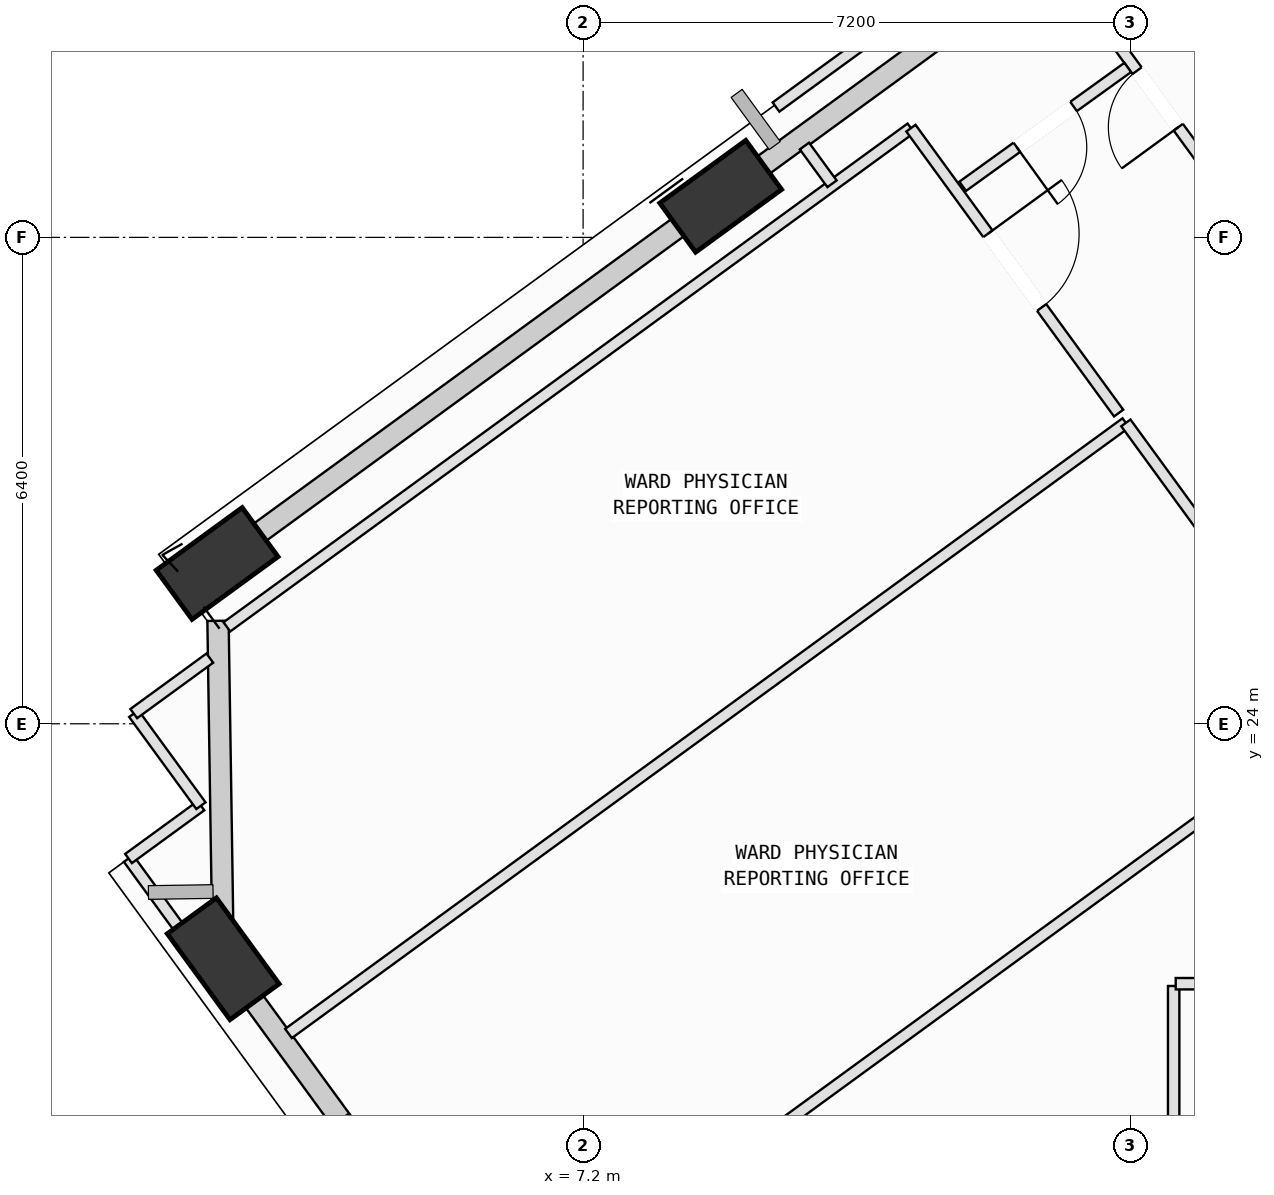
"""IFC4 building model, lengths in metres.
Left out: names, types, materials, properties, quantities, classifications, styles, units other than length and angle.
Written with IfcOpenShell. Run it as: python <this file> out.ifc"""

import sys

from ifc_helpers import new_model, si_unit, direction, frame, frame_2d, origin, origin_2d, place, context, subcontext, project, spatial, rectangle, extrude, element, fill, save


model = new_model("IFC4")
c1 = context("Model", 3, precision=1e-05, world=origin(), true_north=direction((0.0, 1.0)))
c2 = subcontext(c1, "Body", "Model", "MODEL_VIEW")
j1 = project(units=[si_unit("LENGTHUNIT", "METRE"), si_unit("PLANEANGLEUNIT", "RADIAN")], contexts=[c1])
p1 = place(None, origin())
s1 = spatial("IfcSite", under=j1, at=p1, CompositionType="ELEMENT")
p2 = place(p1, origin())
s2 = spatial("IfcBuilding", under=s1, at=p2, CompositionType="ELEMENT")
p3 = place(p2, frame((0.0, 0.0, 177.8)))
s3 = spatial("IfcBuildingStorey", under=s2, at=p3, CompositionType="ELEMENT", Elevation=177.8)
p4 = place(p3, frame((9.01, 30.941, 0.002), z_axis=(-0.024485078273, -0.101524977159, 0.994531628434), x_axis=(0.922851813441, 0.380208094737, 0.061533203441)))
e1 = element("IfcColumn", 1, at=p4, inside=s3, PredefinedType="COLUMN", context=c2, shape_type="SweptSolid", body=[
    extrude(rectangle(XDim=1.4, YDim=0.8, at=origin_2d()), origin(), (0.0, 0.0, 1.0), 4.018),
])
p5 = place(p3, frame((2.385, 26.109, 0.002), z_axis=(-0.004301534601, -0.128379603084, 0.991715772947), x_axis=(0.827104014737, 0.556929973682, 0.075683242671)))
e2 = element("IfcColumn", 2, at=p5, inside=s3, PredefinedType="COLUMN", context=c2, shape_type="SweptSolid", body=[
    extrude(rectangle(XDim=1.4, YDim=0.8, at=origin_2d()), origin(), (0.0, 0.0, 1.0), 4.03),
])
p6 = place(p3, frame((2.465, 20.908, 0.002), z_axis=(0.017083826497, -0.127825794003, 0.991649489114), x_axis=(-0.690145428743, 0.716129588878, 0.104200283673)))
e3 = element("IfcColumn", 3, at=p6, inside=s3, PredefinedType="COLUMN", context=c2, shape_type="SweptSolid", body=[
    extrude(rectangle(XDim=1.4, YDim=0.8, at=origin_2d()), origin(), (0.0, 0.0, 1.0), 4.03),
])
p7 = place(p3, frame((9.267, 31.128, 0.0), z_axis=(0.0, 0.0, 1.0), x_axis=(0.807974712065, 0.589217162567, 0.0)))
e4 = element("IfcWall", 4, at=p7, inside=s3, PredefinedType="SOLIDWALL", context=c2, shape_type="SweptSolid", body=[
    extrude(rectangle(XDim=7.231, YDim=0.28, at=frame_2d((3.615, 0.0))), origin(), (0.0, 0.0, 1.0), 3.265),
])
p8 = place(p3, frame((2.621, 26.282, 0.0), z_axis=(0.0, 0.0, 1.0), x_axis=(0.807987546016, 0.589199563377, 0.0)))
e5 = element("IfcWall", 5, at=p8, inside=s3, PredefinedType="SOLIDWALL", context=c2, shape_type="SweptSolid", body=[
    extrude(rectangle(XDim=7.27, YDim=0.28, at=frame_2d((3.635, 0.0))), origin(), (0.0, 0.0, 1.0), 3.265),
])
p9 = place(p3, frame((2.461, 21.145, 0.0), z_axis=(0.0, 0.0, 1.0), x_axis=(-0.015365849783, 0.999881938361, 0.0)))
e6 = element("IfcWall", 6, at=p9, inside=s3, PredefinedType="SOLIDWALL", context=c2, shape_type="SweptSolid", body=[
    extrude(rectangle(XDim=4.21, YDim=0.28, at=frame_2d((2.105, 0.0))), origin(), (0.0, 0.0, 1.0), 3.265),
])
p10 = place(p3, frame((6.198, 15.788, 0.0), z_axis=(0.0, 0.0, 1.0), x_axis=(-0.589159176224, 0.808016995534, 0.0)))
e7 = element("IfcWall", 7, at=p10, inside=s3, PredefinedType="SOLIDWALL", context=c2, shape_type="SweptSolid", body=[
    extrude(rectangle(XDim=5.628, YDim=0.28, at=frame_2d((2.814, 0.0))), origin(), (0.0, 0.0, 1.0), 3.265),
])
p11 = place(p10, frame((1.717, 0.0, 0.75)))
e8 = element("IfcOpeningElement", 8, at=p11, cuts=e7, PredefinedType="OPENING", context=c2, shape_type="SweptSolid", body=[
    extrude(rectangle(XDim=2.0, YDim=1.95, at=frame_2d((1.0, 0.975))), frame((0.0, 0.15, 0.0), z_axis=(0.0, -1.0, 0.0), x_axis=(1.0, 0.0, 0.0)), (0.0, 0.0, 1.0), 0.3),
])
p12 = place(p3, frame((14.97, 20.55, 0.0), z_axis=(0.0, 0.0, 1.0), x_axis=(0.0, -1.0, 0.0)))
e9 = element("IfcWall", 9, at=p12, inside=s3, PredefinedType="PARTITIONING", context=c2, shape_type="SweptSolid", body=[
    extrude(rectangle(XDim=2.32, YDim=0.15, at=frame_2d((1.16, 0.0))), origin(), (0.0, 0.0, 1.0), 3.78),
])
p13 = place(p3, frame((6.152, 16.047, 0.0), z_axis=(0.0, 0.0, 1.0), x_axis=(0.807978938545, 0.589211366886, 0.0)))
e10 = element("IfcWall", 10, at=p13, inside=s3, PredefinedType="PARTITIONING", context=c2, shape_type="SweptSolid", body=[
    extrude(rectangle(XDim=13.635, YDim=0.15, at=frame_2d((6.817, 0.0))), origin(), (0.0, 0.0, 1.0), 3.78),
])
p14 = place(p3, frame((19.722, 20.58, 0.0), z_axis=(0.0, 0.0, 1.0), x_axis=(-1.0, 0.0, 0.0)))
e11 = element("IfcWall", 11, at=p14, inside=s3, PredefinedType="PARTITIONING", context=c2, shape_type="SweptSolid", body=[
    extrude(rectangle(XDim=4.725, YDim=0.15, at=frame_2d((2.362, 0.0))), origin(), (0.0, 0.0, 1.0), 3.78),
])
p15 = place(p14, frame((1.762, 0.0, 0.0)))
e12 = element("IfcOpeningElement", 12, at=p15, cuts=e11, PredefinedType="OPENING", context=c2, shape_type="SweptSolid", body=[
    extrude(rectangle(XDim=1.2, YDim=2.15, at=frame_2d((0.6, 1.075))), frame((0.0, 0.085, 0.0), z_axis=(0.0, -1.0, 0.0), x_axis=(1.0, 0.0, 0.0)), (0.0, 0.0, 1.0), 0.17),
])
p16 = place(p3, frame((3.324, 19.925, 0.0), z_axis=(0.0, 0.0, 1.0), x_axis=(0.807985154612, 0.589202842769, 0.0)))
e13 = element("IfcWall", 13, at=p16, inside=s3, PredefinedType="PARTITIONING", context=c2, shape_type="SweptSolid", body=[
    extrude(rectangle(XDim=13.635, YDim=0.15, at=frame_2d((6.818, 0.0))), origin(), (0.0, 0.0, 1.0), 3.78),
])
p17 = place(p3, frame((14.341, 27.959, 0.0), z_axis=(0.0, 0.0, 1.0), x_axis=(0.589203646607, -0.807984568432, 0.0)))
e14 = element("IfcWall", 14, at=p17, inside=s3, PredefinedType="PARTITIONING", context=c2, shape_type="SweptSolid", body=[
    extrude(rectangle(XDim=4.64, YDim=0.15, at=frame_2d((2.32, 0.0))), origin(), (0.0, 0.0, 1.0), 3.78),
])
p18 = place(p17, frame((1.72, 0.0, 0.0)))
e15 = element("IfcOpeningElement", 15, at=p18, cuts=e14, PredefinedType="OPENING", context=c2, shape_type="SweptSolid", body=[
    extrude(rectangle(XDim=1.2, YDim=2.15, at=frame_2d((0.6, 1.075))), frame((0.0, 0.085, 0.0), z_axis=(0.0, -1.0, 0.0), x_axis=(1.0, 0.0, 0.0)), (0.0, 0.0, 1.0), 0.17),
])
p19 = place(p3, frame((2.513, 25.275, 0.0), z_axis=(0.0, 0.0, 1.0), x_axis=(0.808028399197, 0.589143536068, 0.0)))
e16 = element("IfcWall", 16, at=p19, inside=s3, PredefinedType="PARTITIONING", context=c2, shape_type="SweptSolid", body=[
    extrude(rectangle(XDim=11.138, YDim=0.15, at=frame_2d((5.569, 0.0))), origin(), (0.0, 0.0, 1.0), 3.265),
])
p20 = place(p3, frame((11.513, 31.837, 0.0), z_axis=(0.0, 0.0, 1.0), x_axis=(0.589100581197, -0.808059716378, 0.0)))
e17 = element("IfcWall", 17, at=p20, inside=s3, PredefinedType="PARTITIONING", context=c2, shape_type="SweptSolid", body=[
    extrude(rectangle(XDim=4.64, YDim=0.15, at=frame_2d((2.32, 0.0))), origin(), (0.0, 0.0, 1.0), 3.78),
])
p21 = place(p20, frame((1.72, 0.0, 0.0)))
e18 = element("IfcOpeningElement", 18, at=p21, cuts=e17, PredefinedType="OPENING", context=c2, shape_type="SweptSolid", body=[
    extrude(rectangle(XDim=1.2, YDim=2.15, at=frame_2d((0.6, 1.075))), frame((0.0, 0.085, 0.0), z_axis=(0.0, -1.0, 0.0), x_axis=(1.0, 0.0, 0.0)), (0.0, 0.0, 1.0), 0.17),
])
p22 = place(p3, frame((2.697, 20.2, 0.0), z_axis=(0.0, 0.0, 1.0), x_axis=(-0.589154949726, 0.808020077234, 0.0)))
e19 = element("IfcWall", 19, at=p22, inside=s3, PredefinedType="PARTITIONING", context=c2, shape_type="SweptSolid", body=[
    extrude(rectangle(XDim=2.509, YDim=0.15, at=frame_2d((1.254, 0.0))), origin(), (0.0, 0.0, 1.0), 3.265),
])
p23 = place(p3, frame((1.219, 22.227, 0.0), z_axis=(0.0, 0.0, 1.0), x_axis=(0.80797468736, 0.589217196443, 0.0)))
e20 = element("IfcWall", 20, at=p23, inside=s3, PredefinedType="PARTITIONING", context=c2, shape_type="SweptSolid", body=[
    extrude(rectangle(XDim=1.18, YDim=0.15, at=frame_2d((0.59, 0.0))), origin(), (0.0, 0.0, 1.0), 3.78),
])
p24 = place(p3, frame((2.172, 22.922, 0.0), z_axis=(0.0, 0.0, 1.0), x_axis=(-0.589322677246, 0.807897754722, 0.0)))
e21 = element("IfcWall", 21, at=p24, inside=s3, PredefinedType="PARTITIONING", context=c2, shape_type="SweptSolid", body=[
    extrude(rectangle(XDim=1.5, YDim=0.15, at=frame_2d((0.75, 0.0))), origin(), (0.0, 0.0, 1.0), 3.78),
])
p25 = place(p3, frame((1.288, 24.134, 0.0), z_axis=(0.0, 0.0, 1.0), x_axis=(0.807968439225, 0.589225764216, 0.0)))
e22 = element("IfcWall", 22, at=p25, inside=s3, PredefinedType="PARTITIONING", context=c2, shape_type="SweptSolid", body=[
    extrude(rectangle(XDim=1.239, YDim=0.15, at=frame_2d((0.619, 0.0))), origin(), (0.0, 0.0, 1.0), 3.78),
])
p26 = place(p3, frame((16.078, 30.414, 0.0), z_axis=(0.0, 0.0, 1.0), x_axis=(-0.589322799206, 0.807897665757, 0.0)))
e23 = element("IfcWall", 23, at=p26, inside=s3, PredefinedType="PARTITIONING", context=c2, shape_type="SweptSolid", body=[
    extrude(rectangle(XDim=4.475, YDim=0.15, at=frame_2d((2.237, 0.0))), origin(), (0.0, 0.0, 1.0), 3.78),
])
p27 = place(p26, frame((1.777, 0.0, 0.0)))
e24 = element("IfcOpeningElement", 24, at=p27, cuts=e23, PredefinedType="OPENING", context=c2, shape_type="SweptSolid", body=[
    extrude(rectangle(XDim=0.92, YDim=2.1, at=frame_2d((0.46, 1.05))), frame((0.0, 0.085, 0.0), z_axis=(0.0, -1.0, 0.0), x_axis=(1.0, 0.0, 0.0)), (0.0, 0.0, 1.0), 0.17),
])
p28 = place(p3, frame((14.366, 32.636, 0.0), z_axis=(0.0, 0.0, 1.0), x_axis=(-0.811496275177, -0.584357592039, 0.0)))
e25 = element("IfcWall", 25, at=p28, inside=s3, PredefinedType="PARTITIONING", context=c2, shape_type="SweptSolid", body=[
    extrude(rectangle(XDim=2.676, YDim=0.15, at=frame_2d((1.338, 0.0))), origin(), (0.0, 0.0, 1.0), 3.78),
])
p29 = place(p28, frame((0.878, 0.0, 0.0)))
e26 = element("IfcOpeningElement", 26, at=p29, cuts=e25, PredefinedType="OPENING", context=c2, shape_type="SweptSolid", body=[
    extrude(rectangle(XDim=0.92, YDim=2.1, at=frame_2d((0.46, 1.05))), frame((0.0, 0.085, 0.0), z_axis=(0.0, -1.0, 0.0), x_axis=(1.0, 0.0, 0.0)), (0.0, 0.0, 1.0), 0.17),
])
p30 = place(p3, frame((10.475, 31.105, 0.0), z_axis=(0.0, 0.0, 1.0), x_axis=(-0.589797786762, 0.80755097098, 0.0)))
e27 = element("IfcWall", 27, at=p30, inside=s3, PredefinedType="PARTITIONING", context=c2, shape_type="SweptSolid", body=[
    extrude(rectangle(XDim=0.615, YDim=0.15, at=frame_2d((0.308, 0.0))), origin(), (0.0, 0.0, 1.0), 3.78),
])
p31 = place(p3, frame((9.738, 32.115, 0.0), z_axis=(0.0, 0.0, 1.0), x_axis=(0.807986860135, 0.589200503945, 0.0)))
e28 = element("IfcWall", 28, at=p31, inside=s3, PredefinedType="PARTITIONING", context=c2, shape_type="SweptSolid", body=[
    extrude(rectangle(XDim=5.74, YDim=0.15, at=frame_2d((2.87, 0.0))), origin(), (0.0, 0.0, 1.0), 3.78),
])
p32 = place(p21, origin())
e29 = element("IfcDoor", 29, at=p32, inside=s3, OperationType="SINGLE_SWING_LEFT", PredefinedType="DOOR", context=c2, shape_type="SweptSolid", body=[
    extrude(rectangle(XDim=1.2, YDim=2.15, at=frame_2d((0.6, 1.075))), frame((0.0, 0.025, 0.0), z_axis=(0.0, -1.0, 0.0), x_axis=(1.0, 0.0, 0.0)), (0.0, 0.0, 1.0), 0.05),
])
fill(e18, e29)
p33 = place(p27, origin())
e30 = element("IfcDoor", 30, at=p33, inside=s3, OperationType="SINGLE_SWING_LEFT", PredefinedType="DOOR", context=c2, shape_type="SweptSolid", body=[
    extrude(rectangle(XDim=0.92, YDim=2.1, at=frame_2d((0.46, 1.05))), frame((0.0, 0.025, 0.0), z_axis=(0.0, -1.0, 0.0), x_axis=(1.0, 0.0, 0.0)), (0.0, 0.0, 1.0), 0.05),
])
fill(e24, e30)
p34 = place(p29, origin())
e31 = element("IfcDoor", 31, at=p34, inside=s3, OperationType="SINGLE_SWING_RIGHT", PredefinedType="DOOR", context=c2, shape_type="SweptSolid", body=[
    extrude(rectangle(XDim=0.92, YDim=2.1, at=frame_2d((0.46, 1.05))), frame((0.0, 0.025, 0.0), z_axis=(0.0, -1.0, 0.0), x_axis=(1.0, 0.0, 0.0)), (0.0, 0.0, 1.0), 0.05),
])
fill(e26, e31)
save(model, sys.argv[1])
